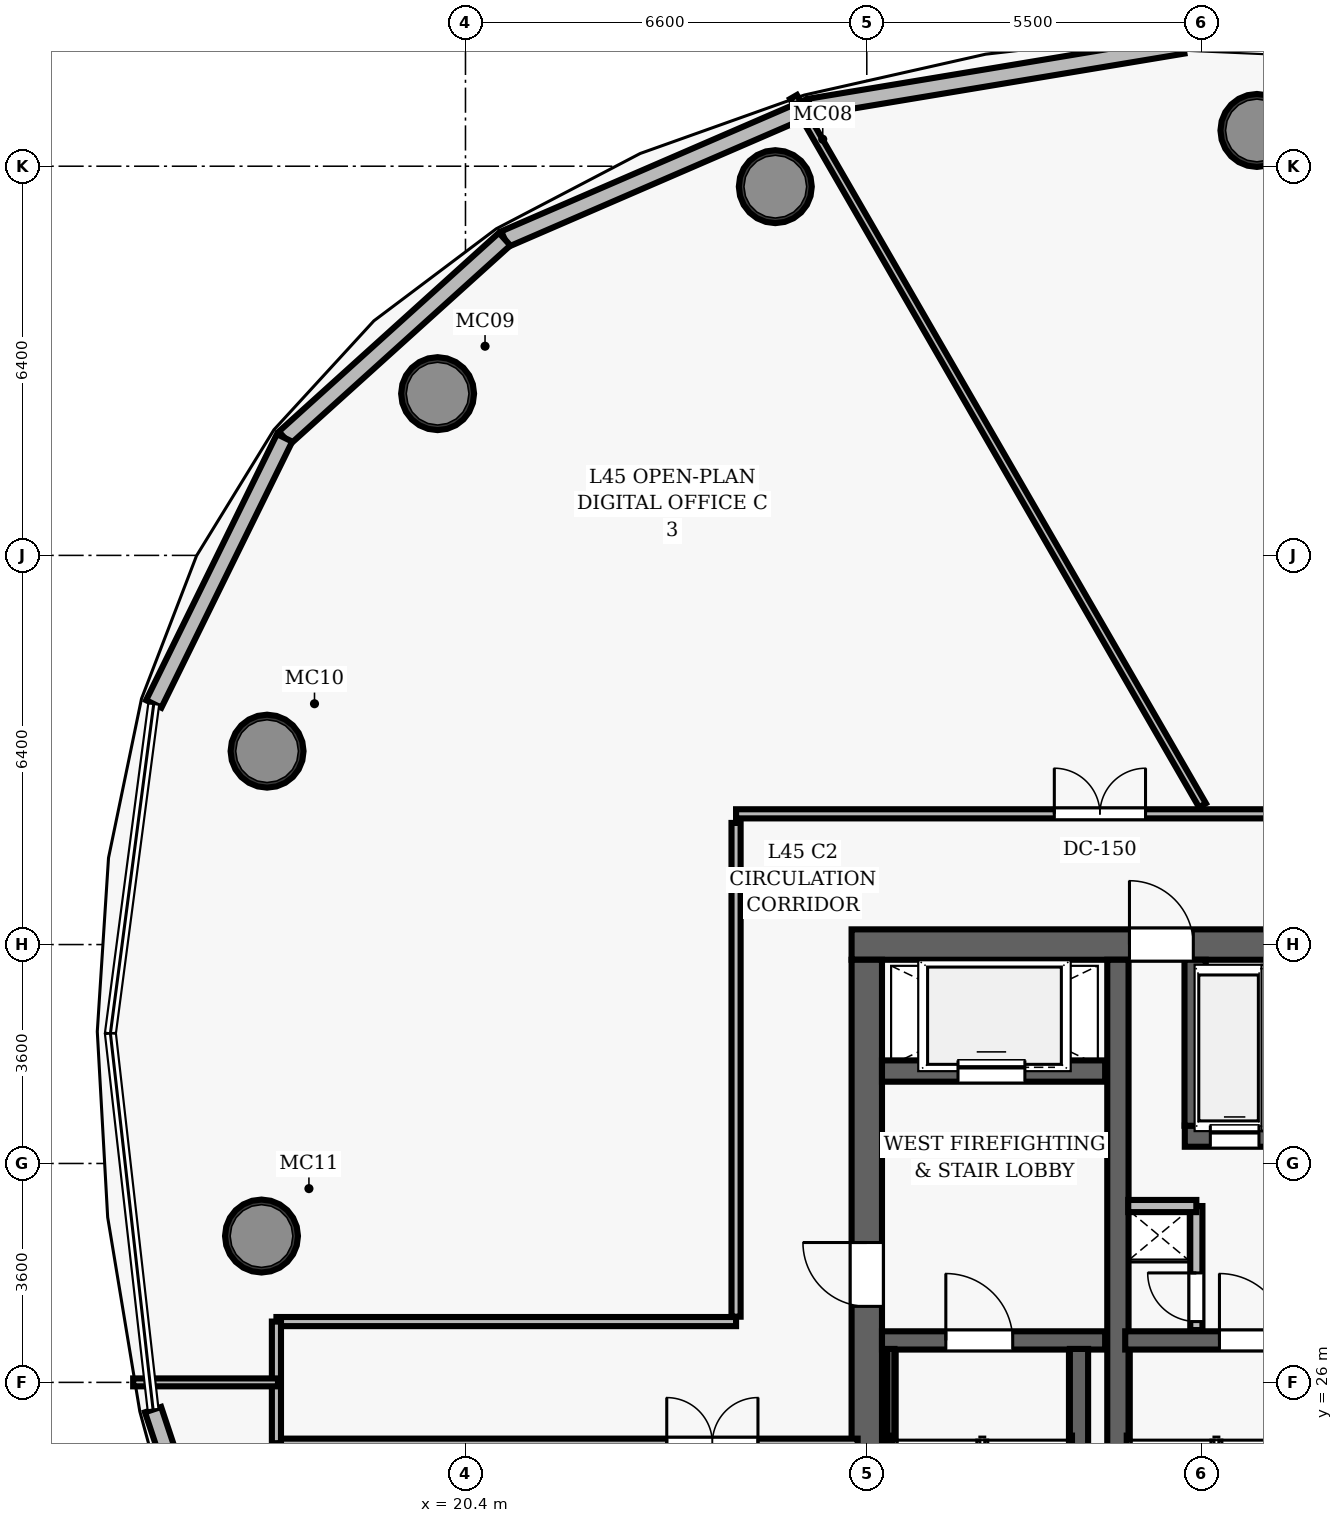
"""IFC4 building model, lengths in metres.
Left out: names, types, materials, properties, quantities, classifications, styles, units other than length and angle.
Written with IfcOpenShell. Run it as: python <this file> out.ifc"""

import sys

from ifc_helpers import new_model, si_unit, direction, frame, frame_2d, origin, origin_2d, place, context, subcontext, project, spatial, rectangle, hollow_circle, extrude, element, fill, save


model = new_model("IFC4")
c1 = context("Model", 3, precision=1e-05, world=origin(), true_north=direction((0.0, 1.0)))
c2 = subcontext(c1, "Body", "Model", "MODEL_VIEW")
j1 = project(units=[si_unit("LENGTHUNIT", "METRE"), si_unit("PLANEANGLEUNIT", "RADIAN")], contexts=[c1])
p1 = place(None, origin())
s1 = spatial("IfcSite", under=j1, at=p1, CompositionType="ELEMENT")
p2 = place(p1, origin())
s2 = spatial("IfcBuilding", under=s1, at=p2, CompositionType="ELEMENT")
p3 = place(p2, frame((0.0, 0.0, 178.9)))
s3 = spatial("IfcBuildingStorey", under=s2, at=p3, CompositionType="ELEMENT", Elevation=178.9)
p4 = place(p3, frame((26.75, 33.2, 0.0), z_axis=(0.0, 0.0, 1.0), x_axis=(1.0, 0.0, 0.0)))
e1 = element("IfcWall", 1, at=p4, inside=s3, PredefinedType="SHEAR", context=c2, shape_type="SweptSolid", body=[
    extrude(rectangle(XDim=22.5, YDim=0.5, at=frame_2d((11.25, 0.0))), origin(), (0.0, 0.0, 1.0), 3.85),
])
p5 = place(p4, frame((4.57, 0.0, 0.0)))
e2 = element("IfcOpeningElement", 2, at=p5, cuts=e1, PredefinedType="OPENING", context=c2, shape_type="SweptSolid", body=[
    extrude(rectangle(XDim=1.05, YDim=2.15, at=frame_2d((0.525, 1.075))), frame((0.0, 0.26, 0.0), z_axis=(0.0, -1.0, 0.0), x_axis=(1.0, 0.0, 0.0)), (0.0, 0.0, 1.0), 0.52),
])
p6 = place(p4, frame((14.47, 0.0, 0.0)))
e3 = element("IfcOpeningElement", 3, at=p6, cuts=e1, PredefinedType="OPENING", context=c2, shape_type="SweptSolid", body=[
    extrude(rectangle(XDim=1.05, YDim=2.15, at=frame_2d((0.525, 1.075))), frame((0.0, 0.26, 0.0), z_axis=(0.0, -1.0, 0.0), x_axis=(1.0, 0.0, 0.0)), (0.0, 0.0, 1.0), 0.52),
])
p7 = place(p3, frame((27.0, 19.05, 0.0), z_axis=(0.0, 0.0, 1.0), x_axis=(0.0, 1.0, 0.0)))
e4 = element("IfcWall", 4, at=p7, inside=s3, PredefinedType="SHEAR", context=c2, shape_type="SweptSolid", body=[
    extrude(rectangle(XDim=13.9, YDim=0.5, at=frame_2d((6.95, 0.0))), origin(), (0.0, 0.0, 1.0), 3.85),
])
p8 = place(p7, frame((8.2, 0.0, 0.0)))
e5 = element("IfcOpeningElement", 5, at=p8, cuts=e4, PredefinedType="OPENING", context=c2, shape_type="SweptSolid", body=[
    extrude(rectangle(XDim=1.05, YDim=2.15, at=frame_2d((0.525, 1.075))), frame((0.0, 0.26, 0.0), z_axis=(0.0, -1.0, 0.0), x_axis=(1.0, 0.0, 0.0)), (0.0, 0.0, 1.0), 0.52),
])
p9 = place(p3, frame((31.13, 19.05, 0.0), z_axis=(0.0, 0.0, 1.0), x_axis=(0.0, 1.0, 0.0)))
e6 = element("IfcWall", 6, at=p9, inside=s3, PredefinedType="SHEAR", context=c2, shape_type="SweptSolid", body=[
    extrude(rectangle(XDim=13.9, YDim=0.35, at=frame_2d((6.95, 0.0))), origin(), (0.0, 0.0, 1.0), 3.85),
])
for number, where, z_axis, x_axis in (
    (7, (33.416, 46.588, 0.0), (0.0, 0.0, 1.0), (1.0, 0.0, 0.0)),
    (8, (25.496, 45.664, 0.0), (0.0, 0.0, 1.0), (1.0, 0.0, 0.0)),
    (9, (19.942, 42.26, 0.0), (0.0, 0.0, 1.0), (1.0, 0.0, 0.0)),
    (10, (17.137, 36.381, 0.0), (0.0, 0.0, 1.0), (1.0, 0.0, 0.0)),
    (11, (17.045, 28.406, 0.0), (0.0, 0.0, 1.0), (1.0, 0.0, 0.0)),
):
    element("IfcColumn", number, at=place(p3, frame(where, z_axis=z_axis, x_axis=x_axis)), inside=s3, PredefinedType="COLUMN", context=c2, shape_type="SweptSolid", body=[
        extrude(hollow_circle(Radius=0.6, WallThickness=0.05, at=origin_2d()), origin(), (0.0, 0.0, 1.0), 3.85),
    ])
p10 = place(p3, frame((27.25, 26.69, 0.0), z_axis=(0.0, 0.0, 1.0), x_axis=(1.0, 0.0, 0.0)))
e12 = element("IfcWall", 12, at=p10, inside=s3, PredefinedType="SHEAR", context=c2, shape_type="SweptSolid", body=[
    extrude(rectangle(XDim=3.67, YDim=0.3, at=frame_2d((1.835, 0.0))), origin(), (0.0, 0.0, 1.0), 3.85),
])
p11 = place(p10, frame((1.05, 0.0, 0.0)))
e13 = element("IfcOpeningElement", 13, at=p11, cuts=e12, PredefinedType="OPENING", context=c2, shape_type="SweptSolid", body=[
    extrude(rectangle(XDim=1.1, YDim=2.15, at=frame_2d((0.55, 1.075))), frame((0.0, 0.16, 0.0), z_axis=(0.0, -1.0, 0.0), x_axis=(1.0, 0.0, 0.0)), (0.0, 0.0, 1.0), 0.32),
])
p12 = place(p3, frame((30.49, 19.05, 0.0), z_axis=(0.0, 0.0, 1.0), x_axis=(0.0, 1.0, 0.0)))
e14 = element("IfcWall", 14, at=p12, inside=s3, PredefinedType="SHEAR", context=c2, shape_type="SweptSolid", body=[
    extrude(rectangle(XDim=7.5, YDim=0.3, at=frame_2d((3.75, 0.0))), origin(), (0.0, 0.0, 1.0), 3.85),
])
p13 = place(p3, frame((27.395, 19.1, 0.0), z_axis=(0.0, 0.0, 1.0), x_axis=(0.0, 1.0, 0.0)))
e15 = element("IfcWall", 15, at=p13, inside=s3, PredefinedType="SHEAR", context=c2, shape_type="SweptSolid", body=[
    extrude(rectangle(XDim=7.45, YDim=0.12, at=frame_2d((3.725, 0.0))), origin(), (0.0, 0.0, 1.0), 3.85),
])
p14 = place(p3, frame((27.25, 31.12, 0.0), z_axis=(0.0, 0.0, 1.0), x_axis=(1.0, 0.0, 0.0)))
e16 = element("IfcWall", 16, at=p14, inside=s3, PredefinedType="SHEAR", context=c2, shape_type="SweptSolid", body=[
    extrude(rectangle(XDim=3.67, YDim=0.35, at=frame_2d((1.835, 0.0))), origin(), (0.0, 0.0, 1.0), 3.035),
])
p15 = place(p14, frame((1.25, 0.0, 0.0)))
e17 = element("IfcOpeningElement", 17, at=p15, cuts=e16, PredefinedType="OPENING", context=c2, shape_type="SweptSolid", body=[
    extrude(rectangle(XDim=1.1, YDim=2.15, at=frame_2d((0.55, 1.075))), frame((0.0, 0.185, 0.0), z_axis=(0.0, -1.0, 0.0), x_axis=(1.0, 0.0, 0.0)), (0.0, 0.0, 1.0), 0.37),
])
p16 = place(p3, frame((31.25, 26.69, 0.0), z_axis=(0.0, 0.0, 1.0), x_axis=(1.0, 0.0, 0.0)))
e18 = element("IfcWall", 18, at=p16, inside=s3, PredefinedType="SHEAR", context=c2, shape_type="SweptSolid", body=[
    extrude(rectangle(XDim=3.56, YDim=0.3, at=frame_2d((1.78, 0.0))), origin(), (0.0, 0.0, 1.0), 3.85),
])
p17 = place(p16, frame((1.55, 0.0, 0.0)))
e19 = element("IfcOpeningElement", 19, at=p17, cuts=e18, PredefinedType="OPENING", context=c2, shape_type="SweptSolid", body=[
    extrude(rectangle(XDim=1.1, YDim=2.15, at=frame_2d((0.55, 1.075))), frame((0.0, 0.16, 0.0), z_axis=(0.0, -1.0, 0.0), x_axis=(1.0, 0.0, 0.0)), (0.0, 0.0, 1.0), 0.32),
])
p18 = place(p3, frame((32.23, 30.05, 0.0), z_axis=(0.0, 0.0, 1.0), x_axis=(1.0, 0.0, 0.0)))
e20 = element("IfcWall", 20, at=p18, inside=s3, PredefinedType="SHEAR", context=c2, shape_type="SweptSolid", body=[
    extrude(rectangle(XDim=2.41, YDim=0.35, at=frame_2d((1.205, 0.0))), origin(), (0.0, 0.0, 1.0), 3.035),
])
p19 = place(p18, frame((0.42, 0.0, 0.0)))
e21 = element("IfcOpeningElement", 21, at=p19, cuts=e20, PredefinedType="OPENING", context=c2, shape_type="SweptSolid", body=[
    extrude(rectangle(XDim=0.8, YDim=2.15, at=frame_2d((0.4, 1.075))), frame((0.0, 0.185, 0.0), z_axis=(0.0, -1.0, 0.0), x_axis=(1.0, 0.0, 0.0)), (0.0, 0.0, 1.0), 0.37),
])
p20 = place(p18, frame((1.42, 0.0, 0.0)))
e22 = element("IfcOpeningElement", 22, at=p20, cuts=e20, PredefinedType="OPENING", context=c2, shape_type="SweptSolid", body=[
    extrude(rectangle(XDim=0.8, YDim=2.15, at=frame_2d((0.4, 1.075))), frame((0.0, 0.185, 0.0), z_axis=(0.0, -1.0, 0.0), x_axis=(1.0, 0.0, 0.0)), (0.0, 0.0, 1.0), 0.37),
])
p21 = place(p3, frame((32.4, 30.22, 0.0), z_axis=(0.0, 0.0, 1.0), x_axis=(0.0, 1.0, 0.0)))
e23 = element("IfcWall", 23, at=p21, inside=s3, PredefinedType="SHEAR", context=c2, shape_type="SweptSolid", body=[
    extrude(rectangle(XDim=2.73, YDim=0.35, at=frame_2d((1.365, 0.0))), origin(), (0.0, 0.0, 1.0), 3.035),
])
p22 = place(p3, frame((32.42, 26.86, 0.0), z_axis=(0.0, 0.0, 1.0), x_axis=(0.0, 1.0, 0.0)))
e24 = element("IfcWall", 24, at=p22, inside=s3, PredefinedType="PARTITIONING", context=c2, shape_type="SweptSolid", body=[
    extrude(rectangle(XDim=2.04, YDim=0.2, at=frame_2d((1.02, 0.0))), origin(), (0.0, 0.0, 1.0), 3.035),
])
p23 = place(p22, frame((0.14, 0.0, 0.0)))
e25 = element("IfcOpeningElement", 25, at=p23, cuts=e24, PredefinedType="OPENING", context=c2, shape_type="SweptSolid", body=[
    extrude(rectangle(XDim=0.8, YDim=2.05, at=frame_2d((0.4, 1.025))), frame((0.0, 0.11, 0.0), z_axis=(0.0, -1.0, 0.0), x_axis=(1.0, 0.0, 0.0)), (0.0, 0.0, 1.0), 0.22),
])
p24 = place(p3, frame((31.3, 28.9, 0.0), z_axis=(0.0, 0.0, 1.0), x_axis=(1.0, 0.0, 0.0)))
e26 = element("IfcWall", 26, at=p24, inside=s3, PredefinedType="PARTITIONING", context=c2, shape_type="SweptSolid", body=[
    extrude(rectangle(XDim=1.12, YDim=0.2, at=frame_2d((0.56, 0.0))), origin(), (0.0, 0.0, 1.0), 3.035),
])
p25 = place(p3, frame((24.85, 35.35, 0.0), z_axis=(0.0, 0.0, 1.0), x_axis=(1.0, 0.0, 0.0)))
e27 = element("IfcWall", 27, at=p25, inside=s3, PredefinedType="PARTITIONING", context=c2, shape_type="SweptSolid", body=[
    extrude(rectangle(XDim=26.0, YDim=0.15, at=frame_2d((13.0, 0.0))), origin(), (0.0, 0.0, 1.0), 3.035),
])
p26 = place(p25, frame((19.491, 0.0, 0.0)))
e28 = element("IfcOpeningElement", 28, at=p26, cuts=e27, PredefinedType="OPENING", context=c2, shape_type="SweptSolid", body=[
    extrude(rectangle(XDim=1.5, YDim=2.2, at=frame_2d((0.75, 1.1))), frame((0.0, 0.085, 0.0), z_axis=(0.0, -1.0, 0.0), x_axis=(1.0, 0.0, 0.0)), (0.0, 0.0, 1.0), 0.17),
])
p27 = place(p25, frame((9.516, 0.0, 0.0)))
e29 = element("IfcOpeningElement", 29, at=p27, cuts=e27, PredefinedType="OPENING", context=c2, shape_type="SweptSolid", body=[
    extrude(rectangle(XDim=1.5, YDim=2.2, at=frame_2d((0.75, 1.1))), frame((0.0, 0.085, 0.0), z_axis=(0.0, -1.0, 0.0), x_axis=(1.0, 0.0, 0.0)), (0.0, 0.0, 1.0), 0.17),
])
p28 = place(p25, frame((5.234, 0.0, 0.0)))
e30 = element("IfcOpeningElement", 30, at=p28, cuts=e27, PredefinedType="OPENING", context=c2, shape_type="SweptSolid", body=[
    extrude(rectangle(XDim=1.5, YDim=2.2, at=frame_2d((0.75, 1.1))), frame((0.0, 0.085, 0.0), z_axis=(0.0, -1.0, 0.0), x_axis=(1.0, 0.0, 0.0)), (0.0, 0.0, 1.0), 0.17),
])
p29 = place(p3, frame((24.85, 27.08, 0.0), z_axis=(0.0, 0.0, 1.0), x_axis=(0.0, 1.0, 0.0)))
e31 = element("IfcWall", 31, at=p29, inside=s3, PredefinedType="PARTITIONING", context=c2, shape_type="SweptSolid", body=[
    extrude(rectangle(XDim=8.12, YDim=0.15, at=frame_2d((4.06, 0.0))), origin(), (0.0, 0.0, 1.0), 3.035),
])
p30 = place(p3, frame((17.291, 27.0, 0.0), z_axis=(0.0, 0.0, 1.0), x_axis=(1.0, 0.0, 0.0)))
e32 = element("IfcWall", 32, at=p30, inside=s3, PredefinedType="PARTITIONING", context=c2, shape_type="SweptSolid", body=[
    extrude(rectangle(XDim=7.559, YDim=0.15, at=frame_2d((3.78, 0.0))), origin(), (0.0, 0.0, 1.0), 3.035),
])
p31 = place(p3, frame((17.291, 25.0, 0.0), z_axis=(0.0, 0.0, 1.0), x_axis=(1.0, 0.0, 0.0)))
e33 = element("IfcWall", 33, at=p31, inside=s3, PredefinedType="PARTITIONING", context=c2, shape_type="SweptSolid", body=[
    extrude(rectangle(XDim=9.559, YDim=0.15, at=frame_2d((4.78, 0.0))), origin(), (0.0, 0.0, 1.0), 3.035),
])
p32 = place(p31, frame((6.419, 0.0, 0.0)))
e34 = element("IfcOpeningElement", 34, at=p32, cuts=e33, PredefinedType="OPENING", context=c2, shape_type="SweptSolid", body=[
    extrude(rectangle(XDim=1.5, YDim=2.2, at=frame_2d((0.75, 1.1))), frame((0.0, 0.085, 0.0), z_axis=(0.0, -1.0, 0.0), x_axis=(1.0, 0.0, 0.0)), (0.0, 0.0, 1.0), 0.17),
])
p33 = place(p3, frame((17.291, 25.0, 0.0), z_axis=(0.0, 0.0, 1.0), x_axis=(0.0, 1.0, 0.0)))
e35 = element("IfcWall", 35, at=p33, inside=s3, PredefinedType="PARTITIONING", context=c2, shape_type="SweptSolid", body=[
    extrude(rectangle(XDim=2.0, YDim=0.15, at=frame_2d((1.0, 0.0))), origin(), (0.0, 0.0, 1.0), 3.035),
])
p34 = place(p3, frame((32.521, 35.49, 0.0), z_axis=(0.0, 0.0, 1.0), x_axis=(-0.500004209807, 0.866022973237, 0.0)))
e36 = element("IfcWall", 36, at=p34, inside=s3, PredefinedType="PARTITIONING", context=c2, shape_type="SweptSolid", body=[
    extrude(rectangle(XDim=13.451, YDim=0.13, at=frame_2d((6.726, 0.0))), origin(), (0.0, 0.0, 1.0), 3.035),
])
p35 = place(p3, frame((17.317, 26.0, 0.0), z_axis=(0.0, 0.0, 1.0), x_axis=(-1.0, 0.0, 0.0)))
e37 = element("IfcWall", 37, at=p35, inside=s3, PredefinedType="PARTITIONING", context=c2, shape_type="SweptSolid", body=[
    extrude(rectangle(XDim=2.382, YDim=0.13, at=frame_2d((1.191, 0.0))), origin(), (0.0, 0.0, 1.0), 3.035),
])
p36 = place(p3, frame((26.059, 46.971, 0.0), z_axis=(0.0, 0.0, 1.0), x_axis=(0.986490190097, 0.163820343186, 0.0)))
e38 = element("IfcWall", 38, at=p36, inside=s3, PredefinedType="SOLIDWALL", context=c2, shape_type="SweptSolid", body=[
    extrude(rectangle(XDim=6.227, YDim=0.28, at=frame_2d((3.113, 0.0))), origin(), (0.0, 0.0, 1.0), 3.62),
])
p37 = place(p3, frame((21.044, 44.801, 0.0), z_axis=(0.0, 0.0, 1.0), x_axis=(0.917783118747, 0.39708204057, 0.0)))
e39 = element("IfcWall", 39, at=p37, inside=s3, PredefinedType="SOLIDWALL", context=c2, shape_type="SweptSolid", body=[
    extrude(rectangle(XDim=5.465, YDim=0.28, at=frame_2d((2.732, 0.0))), origin(), (0.0, 0.0, 1.0), 3.62),
])
for number, where, z_axis, x_axis in (
    (40, (17.425, 41.533, 0.0), (0.0, 0.0, 1.0), (0.742, 0.67, 0.0)),
    (41, (15.273, 37.157, 0.0), (0.0, 0.0, 1.0), (0.441, 0.897, 0.0)),
):
    element("IfcWall", number, at=place(p3, frame(where, z_axis=z_axis, x_axis=x_axis)), inside=s3, PredefinedType="SOLIDWALL", context=c2, shape_type="SweptSolid", body=[
        extrude(rectangle(XDim=4.876, YDim=0.28, at=frame_2d((2.438, 0.0))), origin(), (0.0, 0.0, 1.0), 3.62),
    ])
p38 = place(p3, frame((17.403, 19.115, 0.0), z_axis=(0.0, 0.0, 1.0), x_axis=(-0.315590755591, 0.948895397283, 0.0)))
e42 = element("IfcWall", 42, at=p38, inside=s3, PredefinedType="SOLIDWALL", context=c2, shape_type="SweptSolid", body=[
    extrude(rectangle(XDim=6.784, YDim=0.28, at=frame_2d((3.392, 0.0))), origin(), (0.0, 0.0, 1.0), 3.62),
])
p39 = place(p11, origin())
e43 = element("IfcDoor", 43, at=p39, inside=s3, OperationType="SINGLE_SWING_LEFT", PredefinedType="DOOR", context=c2, shape_type="SweptSolid", body=[
    extrude(rectangle(XDim=1.1, YDim=2.15, at=frame_2d((0.55, 1.075))), frame((0.0, 0.025, 0.0), z_axis=(0.0, -1.0, 0.0), x_axis=(1.0, 0.0, 0.0)), (0.0, 0.0, 1.0), 0.05),
])
fill(e13, e43)
p40 = place(p8, origin())
e44 = element("IfcDoor", 44, at=p40, inside=s3, OperationType="SINGLE_SWING_RIGHT", PredefinedType="DOOR", context=c2, shape_type="SweptSolid", body=[
    extrude(rectangle(XDim=1.05, YDim=2.15, at=frame_2d((0.525, 1.075))), frame((0.0, 0.025, 0.0), z_axis=(0.0, -1.0, 0.0), x_axis=(1.0, 0.0, 0.0)), (0.0, 0.0, 1.0), 0.05),
])
fill(e5, e44)
p41 = place(p17, origin())
e45 = element("IfcDoor", 45, at=p41, inside=s3, OperationType="SINGLE_SWING_LEFT", PredefinedType="DOOR", context=c2, shape_type="SweptSolid", body=[
    extrude(rectangle(XDim=1.1, YDim=2.15, at=frame_2d((0.55, 1.075))), frame((0.0, 0.025, 0.0), z_axis=(0.0, -1.0, 0.0), x_axis=(1.0, 0.0, 0.0)), (0.0, 0.0, 1.0), 0.05),
])
fill(e19, e45)
p42 = place(p23, origin())
e46 = element("IfcDoor", 46, at=p42, inside=s3, OperationType="SINGLE_SWING_RIGHT", PredefinedType="DOOR", context=c2, shape_type="SweptSolid", body=[
    extrude(rectangle(XDim=0.8, YDim=2.05, at=frame_2d((0.4, 1.025))), frame((0.0, 0.025, 0.0), z_axis=(0.0, -1.0, 0.0), x_axis=(1.0, 0.0, 0.0)), (0.0, 0.0, 1.0), 0.05),
])
fill(e25, e46)
p43 = place(p5, origin())
e47 = element("IfcDoor", 47, at=p43, inside=s3, OperationType="SINGLE_SWING_LEFT", PredefinedType="DOOR", context=c2, shape_type="SweptSolid", body=[
    extrude(rectangle(XDim=1.05, YDim=2.15, at=frame_2d((0.525, 1.075))), frame((0.0, 0.025, 0.0), z_axis=(0.0, -1.0, 0.0), x_axis=(1.0, 0.0, 0.0)), (0.0, 0.0, 1.0), 0.05),
])
fill(e2, e47)
p44 = place(p28, origin())
e48 = element("IfcDoor", 48, at=p44, inside=s3, OperationType="DOUBLE_DOOR_SINGLE_SWING", PredefinedType="DOOR", context=c2, shape_type="SweptSolid", body=[
    extrude(rectangle(XDim=1.5, YDim=2.2, at=frame_2d((0.75, 1.1))), frame((0.0, 0.025, 0.0), z_axis=(0.0, -1.0, 0.0), x_axis=(1.0, 0.0, 0.0)), (0.0, 0.0, 1.0), 0.05),
])
fill(e30, e48)
p45 = place(p32, origin())
e49 = element("IfcDoor", 49, at=p45, inside=s3, OperationType="DOUBLE_DOOR_SINGLE_SWING", PredefinedType="DOOR", context=c2, shape_type="SweptSolid", body=[
    extrude(rectangle(XDim=1.5, YDim=2.2, at=frame_2d((0.75, 1.1))), frame((0.0, 0.025, 0.0), z_axis=(0.0, -1.0, 0.0), x_axis=(1.0, 0.0, 0.0)), (0.0, 0.0, 1.0), 0.05),
])
fill(e34, e49)
p46 = place(p15, origin())
e50 = element("IfcDoor", 50, at=p46, inside=s3, OperationType="SLIDING_TO_LEFT", PredefinedType="DOOR", context=c2, shape_type="SweptSolid", body=[
    extrude(rectangle(XDim=1.1, YDim=2.15, at=frame_2d((0.55, 1.075))), frame((0.0, 0.025, 0.0), z_axis=(0.0, -1.0, 0.0), x_axis=(1.0, 0.0, 0.0)), (0.0, 0.0, 1.0), 0.05),
])
fill(e17, e50)
p47 = place(p19, origin())
e51 = element("IfcDoor", 51, at=p47, inside=s3, OperationType="SLIDING_TO_LEFT", PredefinedType="DOOR", context=c2, shape_type="SweptSolid", body=[
    extrude(rectangle(XDim=0.8, YDim=2.15, at=frame_2d((0.4, 1.075))), frame((0.0, 0.025, 0.0), z_axis=(0.0, -1.0, 0.0), x_axis=(1.0, 0.0, 0.0)), (0.0, 0.0, 1.0), 0.05),
])
fill(e21, e51)
save(model, sys.argv[1])
